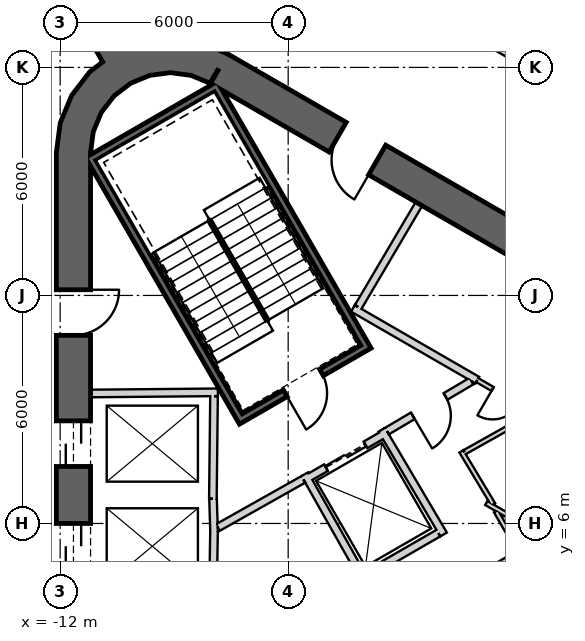
"""IFC4 building model, lengths in metres.
Left out: names, types, materials, properties, quantities, classifications, styles, units other than length and angle.
Written with IfcOpenShell. Run it as: python <this file> out.ifc"""

import sys

from ifc_helpers import new_model, si_unit, direction, frame, frame_2d, origin, place, context, subcontext, project, spatial, polyline, rectangle, outline, extrude, element, fill, save


model = new_model("IFC4")
c1 = context("Model", 3, precision=1e-05, world=origin(), true_north=direction((0.0, 1.0)))
c2 = subcontext(c1, "Body", "Model", "MODEL_VIEW")
j1 = project(units=[si_unit("LENGTHUNIT", "METRE"), si_unit("PLANEANGLEUNIT", "RADIAN")], contexts=[c1])
p1 = place(None, origin())
s1 = spatial("IfcSite", under=j1, at=p1, CompositionType="ELEMENT")
p2 = place(p1, origin())
s2 = spatial("IfcBuilding", under=s1, at=p2, CompositionType="ELEMENT")
p3 = place(p2, frame((0.0, 0.0, 241.2)))
s3 = spatial("IfcBuildingStorey", under=s2, at=p3, CompositionType="ELEMENT", Elevation=241.2)
p4 = place(p3, frame((19.475, 2.208, 0.0), z_axis=(0.0, 0.0, 1.0), x_axis=(-0.866028369851, 0.499994862586, 0.0)))
e1 = element("IfcWall", 1, at=p4, inside=s3, PredefinedType="SHEAR", context=c2, shape_type="SweptSolid", body=[
    extrude(rectangle(XDim=31.523, YDim=0.9, at=frame_2d((15.762, 0.0))), origin(), (0.0, 0.0, 1.0), 4.0),
])
p5 = place(p4, frame((7.062, 0.0, 0.0)))
e2 = element("IfcOpeningElement", 2, at=p5, cuts=e1, PredefinedType="OPENING", context=c2, shape_type="SweptSolid", body=[
    extrude(rectangle(XDim=1.2, YDim=2.4, at=frame_2d((0.6, 1.2))), frame((0.0, 0.46, 0.0), z_axis=(0.0, -1.0, 0.0), x_axis=(1.0, 0.0, 0.0)), (0.0, 0.0, 1.0), 0.92),
])
p6 = place(p4, frame((3.612, 0.0, 0.0)))
e3 = element("IfcOpeningElement", 3, at=p6, cuts=e1, PredefinedType="OPENING", context=c2, shape_type="SweptSolid", body=[
    extrude(rectangle(XDim=1.2, YDim=2.4, at=frame_2d((0.6, 1.2))), frame((0.0, 0.46, 0.0), z_axis=(0.0, -1.0, 0.0), x_axis=(1.0, 0.0, 0.0)), (0.0, 0.0, 1.0), 0.92),
])
p7 = place(p4, frame((26.712, 0.0, 0.0)))
e4 = element("IfcOpeningElement", 4, at=p7, cuts=e1, PredefinedType="OPENING", context=c2, shape_type="SweptSolid", body=[
    extrude(rectangle(XDim=1.2, YDim=2.4, at=frame_2d((0.6, 1.2))), frame((0.0, 0.46, 0.0), z_axis=(0.0, -1.0, 0.0), x_axis=(1.0, 0.0, 0.0)), (0.0, 0.0, 1.0), 0.92),
])
p8 = place(p3, frame((-11.65, 15.762, 0.0), z_axis=(0.0, 0.0, 1.0), x_axis=(0.0, -1.0, 0.0)))
e5 = element("IfcWall", 5, at=p8, inside=s3, PredefinedType="SHEAR", context=c2, shape_type="SweptSolid", body=[
    extrude(rectangle(XDim=31.523, YDim=0.9, at=frame_2d((15.762, 0.0))), origin(), (0.0, 0.0, 1.0), 4.0),
])
p9 = place(p8, frame((7.062, 0.0, 0.0)))
e6 = element("IfcOpeningElement", 6, at=p9, cuts=e5, PredefinedType="OPENING", context=c2, shape_type="SweptSolid", body=[
    extrude(rectangle(XDim=1.2, YDim=2.4, at=frame_2d((0.6, 1.2))), frame((0.0, 0.46, 0.0), z_axis=(0.0, -1.0, 0.0), x_axis=(1.0, 0.0, 0.0)), (0.0, 0.0, 1.0), 0.92),
])
p10 = place(p8, frame((9.762, 0.0, 0.0)))
e7 = element("IfcOpeningElement", 7, at=p10, cuts=e5, PredefinedType="OPENING", context=c2, shape_type="SweptSolid", body=[
    extrude(rectangle(XDim=1.2, YDim=2.4, at=frame_2d((0.6, 1.2))), frame((0.0, 0.46, 0.0), z_axis=(0.0, -1.0, 0.0), x_axis=(1.0, 0.0, 0.0)), (0.0, 0.0, 1.0), 0.92),
])
p11 = place(p8, frame((12.462, 0.0, 0.0)))
e8 = element("IfcOpeningElement", 8, at=p11, cuts=e5, PredefinedType="OPENING", context=c2, shape_type="SweptSolid", body=[
    extrude(rectangle(XDim=1.2, YDim=2.4, at=frame_2d((0.6, 1.2))), frame((0.0, 0.46, 0.0), z_axis=(0.0, -1.0, 0.0), x_axis=(1.0, 0.0, 0.0)), (0.0, 0.0, 1.0), 0.92),
])
p12 = place(p8, frame((15.162, 0.0, 0.0)))
e9 = element("IfcOpeningElement", 9, at=p12, cuts=e5, PredefinedType="OPENING", context=c2, shape_type="SweptSolid", body=[
    extrude(rectangle(XDim=1.2, YDim=2.4, at=frame_2d((0.6, 1.2))), frame((0.0, 0.46, 0.0), z_axis=(0.0, -1.0, 0.0), x_axis=(1.0, 0.0, 0.0)), (0.0, 0.0, 1.0), 0.92),
])
p13 = place(p8, frame((17.862, 0.0, 0.0)))
e10 = element("IfcOpeningElement", 10, at=p13, cuts=e5, PredefinedType="OPENING", context=c2, shape_type="SweptSolid", body=[
    extrude(rectangle(XDim=1.2, YDim=2.4, at=frame_2d((0.6, 1.2))), frame((0.0, 0.46, 0.0), z_axis=(0.0, -1.0, 0.0), x_axis=(1.0, 0.0, 0.0)), (0.0, 0.0, 1.0), 0.92),
])
p14 = place(p8, frame((20.562, 0.0, 0.0)))
e11 = element("IfcOpeningElement", 11, at=p14, cuts=e5, PredefinedType="OPENING", context=c2, shape_type="SweptSolid", body=[
    extrude(rectangle(XDim=1.2, YDim=2.4, at=frame_2d((0.6, 1.2))), frame((0.0, 0.46, 0.0), z_axis=(0.0, -1.0, 0.0), x_axis=(1.0, 0.0, 0.0)), (0.0, 0.0, 1.0), 0.92),
])
p15 = place(p8, frame((23.262, 0.0, 0.0)))
e12 = element("IfcOpeningElement", 12, at=p15, cuts=e5, PredefinedType="OPENING", context=c2, shape_type="SweptSolid", body=[
    extrude(rectangle(XDim=1.2, YDim=2.4, at=frame_2d((0.6, 1.2))), frame((0.0, 0.46, 0.0), z_axis=(0.0, -1.0, 0.0), x_axis=(1.0, 0.0, 0.0)), (0.0, 0.0, 1.0), 0.92),
])
p16 = place(p8, frame((3.612, 0.0, 0.0)))
e13 = element("IfcOpeningElement", 13, at=p16, cuts=e5, PredefinedType="OPENING", context=c2, shape_type="SweptSolid", body=[
    extrude(rectangle(XDim=1.2, YDim=2.4, at=frame_2d((0.6, 1.2))), frame((0.0, 0.46, 0.0), z_axis=(0.0, -1.0, 0.0), x_axis=(1.0, 0.0, 0.0)), (0.0, 0.0, 1.0), 0.92),
])
p17 = place(p8, frame((26.712, 0.0, 0.0)))
e14 = element("IfcOpeningElement", 14, at=p17, cuts=e5, PredefinedType="OPENING", context=c2, shape_type="SweptSolid", body=[
    extrude(rectangle(XDim=1.2, YDim=2.4, at=frame_2d((0.6, 1.2))), frame((0.0, 0.46, 0.0), z_axis=(0.0, -1.0, 0.0), x_axis=(1.0, 0.0, 0.0)), (0.0, 0.0, 1.0), 0.92),
])
p18 = place(p3, origin())
e15 = element("IfcWall", 15, at=p18, inside=s3, PredefinedType="SHEAR", context=c2, shape_type="SweptSolid", body=[
    extrude(outline(polyline([(-7.6, 18.36), (-8.323, 18.659), (-9.1, 18.762), (-9.876, 18.659), (-10.6, 18.36), (-11.221, 17.883), (-11.698, 17.262), (-11.998, 16.538), (-12.1, 15.762), (-11.2, 15.762), (-11.128, 16.305), (-10.919, 16.812), (-10.585, 17.247), (-10.15, 17.58), (-9.644, 17.79), (-9.1, 17.862), (-8.556, 17.79), (-8.05, 17.58), (-7.6, 18.36)])), origin(), (0.0, 0.0, 1.0), 4.0),
])
p19 = place(p3, frame((-10.575, 18.316, 0.0), z_axis=(0.0, 0.0, 1.0), x_axis=(-0.500002931134, 0.866023711487, 0.0)))
e16 = element("IfcWall", 16, at=p19, inside=s3, PredefinedType="SHEAR", context=c2, shape_type="SweptSolid", body=[
    extrude(rectangle(XDim=10.9, YDim=0.7, at=frame_2d((5.45, 0.0))), origin(), (0.0, 0.0, 1.0), 4.0),
])
p20 = place(p3, frame((-11.2, 9.42, 0.0), z_axis=(0.0, 0.0, 1.0), x_axis=(0.999957167047, 0.009255488683, 0.0)))
e17 = element("IfcWall", 17, at=p20, inside=s3, PredefinedType="PLUMBINGWALL", context=c2, shape_type="SweptSolid", body=[
    extrude(rectangle(XDim=3.35, YDim=0.2, at=frame_2d((1.675, 0.0))), origin(), (0.0, 0.0, 1.0), 3.7),
])
p21 = place(p3, frame((-7.951, 9.35, 0.0), z_axis=(0.0, 0.0, 1.0), x_axis=(-0.011120469654, -0.999938165666, 0.0)))
e18 = element("IfcWall", 18, at=p21, inside=s3, PredefinedType="PLUMBINGWALL", context=c2, shape_type="SweptSolid", body=[
    extrude(rectangle(XDim=2.7, YDim=0.2, at=frame_2d((1.35, 0.0))), origin(), (0.0, 0.0, 1.0), 3.7),
])
p22 = place(p3, frame((-7.977, 6.65, 0.0), z_axis=(0.0, 0.0, 1.0), x_axis=(0.030861509705, -0.999523670164, 0.0)))
e19 = element("IfcWall", 19, at=p22, inside=s3, PredefinedType="PLUMBINGWALL", context=c2, shape_type="SweptSolid", body=[
    extrude(rectangle(XDim=0.878, YDim=0.2, at=frame_2d((0.439, 0.0))), origin(), (0.0, 0.0, 1.0), 3.7),
])
p23 = place(p3, frame((-7.949, 5.894, 0.0), z_axis=(0.0, 0.0, 1.0), x_axis=(-0.016809909365, -0.999858703491, 0.0)))
e20 = element("IfcWall", 20, at=p23, inside=s3, PredefinedType="PLUMBINGWALL", context=c2, shape_type="SweptSolid", body=[
    extrude(rectangle(XDim=1.844, YDim=0.2, at=frame_2d((0.922, 0.0))), origin(), (0.0, 0.0, 1.0), 3.7),
])
p24 = place(p3, frame((-11.245, 15.678, -0.3), z_axis=(0.0, 0.0, 1.0), x_axis=(0.499977274689, -0.866038523851, 0.0)))
e21 = element("IfcWall", 21, at=p24, inside=s3, PredefinedType="SHEAR", context=c2, shape_type="SweptSolid", body=[
    extrude(rectangle(XDim=8.1, YDim=0.2, at=frame_2d((4.05, 0.0))), origin(), (0.0, 0.0, 1.0), 4.0),
])
p25 = place(p3, frame((-7.818, 17.541, -0.3), z_axis=(0.0, 0.0, 1.0), x_axis=(-0.866044365799, -0.499967155389, 0.0)))
e22 = element("IfcWall", 22, at=p25, inside=s3, PredefinedType="SHEAR", context=c2, shape_type="SweptSolid", body=[
    extrude(rectangle(XDim=3.8, YDim=0.2, at=frame_2d((1.9, 0.0))), origin(), (0.0, 0.0, 1.0), 4.0),
])
p26 = place(p3, frame((-7.854, 17.405, -0.3), z_axis=(0.0, 0.0, 1.0), x_axis=(0.499997992926, -0.866026562566, 0.0)))
e23 = element("IfcWall", 23, at=p26, inside=s3, PredefinedType="SHEAR", context=c2, shape_type="SweptSolid", body=[
    extrude(rectangle(XDim=7.9, YDim=0.2, at=frame_2d((3.95, 0.0))), origin(), (0.0, 0.0, 1.0), 4.0),
])
p27 = place(p3, frame((-7.159, 8.8, -0.3), z_axis=(0.0, 0.0, 1.0), x_axis=(0.866047807691, 0.499961193289, 0.0)))
e24 = element("IfcWall", 24, at=p27, inside=s3, PredefinedType="SHEAR", context=c2, shape_type="SweptSolid", body=[
    extrude(rectangle(XDim=3.6, YDim=0.2, at=frame_2d((1.8, 0.0))), origin(), (0.0, 0.0, 1.0), 4.0),
])
p28 = place(p27, frame((1.25, 0.0, 0.3)))
e25 = element("IfcOpeningElement", 25, at=p28, cuts=e24, PredefinedType="OPENING", context=c2, shape_type="SweptSolid", body=[
    extrude(rectangle(XDim=1.1, YDim=2.1, at=frame_2d((0.55, 1.05))), frame((0.0, 0.11, 0.0), z_axis=(0.0, -1.0, 0.0), x_axis=(1.0, 0.0, 0.0)), (0.0, 0.0, 1.0), 0.22),
])
p29 = place(p3, frame((-5.524, 7.168, 0.0), z_axis=(0.0, 0.0, 1.0), x_axis=(0.866024647952, 0.500001309137, 0.0)))
e26 = element("IfcWall", 26, at=p29, inside=s3, PredefinedType="PLUMBINGWALL", context=c2, shape_type="SweptSolid", body=[
    extrude(rectangle(XDim=2.4, YDim=0.2, at=frame_2d((1.2, 0.0))), origin(), (0.0, 0.0, 1.0), 3.7),
])
p30 = place(p29, frame((0.6, 0.0, 0.0)))
e27 = element("IfcOpeningElement", 27, at=p30, cuts=e26, PredefinedType="OPENING", context=c2, shape_type="SweptSolid", body=[
    extrude(rectangle(XDim=1.2, YDim=2.4, at=frame_2d((0.6, 1.2))), frame((0.0, 0.11, 0.0), z_axis=(0.0, -1.0, 0.0), x_axis=(1.0, 0.0, 0.0)), (0.0, 0.0, 1.0), 0.22),
])
p31 = place(p3, frame((-4.039, 4.596, 0.0), z_axis=(0.0, 0.0, 1.0), x_axis=(-0.491322718731, 0.870977603649, 0.0)))
e28 = element("IfcWall", 28, at=p31, inside=s3, PredefinedType="PLUMBINGWALL", context=c2, shape_type="SweptSolid", body=[
    extrude(rectangle(XDim=3.1, YDim=0.2, at=frame_2d((1.55, 0.0))), origin(), (0.0, 0.0, 1.0), 3.7),
])
p32 = place(p3, frame((-3.538, 8.465, 0.0), z_axis=(0.0, 0.0, 1.0), x_axis=(0.508616218331, -0.860993346345, 0.0)))
e29 = element("IfcWall", 29, at=p32, inside=s3, PredefinedType="PLUMBINGWALL", context=c2, shape_type="SweptSolid", body=[
    extrude(rectangle(XDim=3.2, YDim=0.2, at=frame_2d((1.6, 0.0))), origin(), (0.0, 0.0, 1.0), 3.7),
])
p33 = place(p3, frame((-2.047, 5.746, 0.0), z_axis=(0.0, 0.0, 1.0), x_axis=(-0.866019606374, -0.500010041276, 0.0)))
e30 = element("IfcWall", 30, at=p33, inside=s3, PredefinedType="PLUMBINGWALL", context=c2, shape_type="SweptSolid", body=[
    extrude(rectangle(XDim=2.205, YDim=0.2, at=frame_2d((1.102, 0.0))), origin(), (0.0, 0.0, 1.0), 3.7),
])
p34 = place(p3, frame((-1.024, 9.771, 0.0), z_axis=(0.0, 0.0, 1.0), x_axis=(0.866039397417, -0.499975761534, 0.0)))
e31 = element("IfcWall", 31, at=p34, inside=s3, PredefinedType="PARTITIONING", context=c2, shape_type="SweptSolid", body=[
    extrude(rectangle(XDim=1.752, YDim=0.12, at=frame_2d((0.876, 0.0))), origin(), (0.0, 0.0, 1.0), 3.7),
])
p35 = place(p34, frame((0.466, 0.0, 0.0)))
e32 = element("IfcOpeningElement", 32, at=p35, cuts=e31, PredefinedType="OPENING", context=c2, shape_type="SweptSolid", body=[
    extrude(rectangle(XDim=0.8, YDim=2.1, at=frame_2d((0.4, 1.05))), frame((0.0, 0.07, 0.0), z_axis=(0.0, -1.0, 0.0), x_axis=(1.0, 0.0, 0.0)), (0.0, 0.0, 1.0), 0.14),
])
p36 = place(p3, frame((-4.296, 11.66, 0.0), z_axis=(0.0, 0.0, 1.0), x_axis=(0.866027389382, -0.499996560828, 0.0)))
e33 = element("IfcWall", 33, at=p36, inside=s3, PredefinedType="PARTITIONING", context=c2, shape_type="SweptSolid", body=[
    extrude(rectangle(XDim=3.778, YDim=0.2, at=frame_2d((1.889, 0.0))), origin(), (0.0, 0.0, 1.0), 3.7),
])
p37 = place(p3, frame((-2.558, 14.409, 0.0), z_axis=(0.0, 0.0, 1.0), x_axis=(-0.508018930956, -0.861345903683, 0.0)))
e34 = element("IfcWall", 34, at=p37, inside=s3, PredefinedType="PARTITIONING", context=c2, shape_type="SweptSolid", body=[
    extrude(rectangle(XDim=3.15, YDim=0.2, at=frame_2d((1.575, 0.0))), origin(), (0.0, 0.0, 1.0), 3.7),
])
p38 = place(p3, frame((-5.6, 7.16, 0.0), z_axis=(0.0, 0.0, 1.0), x_axis=(-0.871340486379, -0.490678873396, 0.0)))
e35 = element("IfcWall", 35, at=p38, inside=s3, PredefinedType="PARTITIONING", context=c2, shape_type="SweptSolid", body=[
    extrude(rectangle(XDim=2.581, YDim=0.2, at=frame_2d((1.291, 0.0))), origin(), (0.0, 0.0, 1.0), 3.7),
])
p39 = place(p3, frame((-1.179, 9.745, 0.0), z_axis=(0.0, 0.0, 1.0), x_axis=(-0.860630814782, -0.509229418482, 0.0)))
e36 = element("IfcWall", 36, at=p39, inside=s3, PredefinedType="PARTITIONING", context=c2, shape_type="SweptSolid", body=[
    extrude(rectangle(XDim=2.582, YDim=0.2, at=frame_2d((1.291, 0.0))), origin(), (0.0, 0.0, 1.0), 3.7),
])
p40 = place(p39, frame((0.791, 0.0, 0.0)))
e37 = element("IfcOpeningElement", 37, at=p40, cuts=e36, PredefinedType="OPENING", context=c2, shape_type="SweptSolid", body=[
    extrude(rectangle(XDim=1.0, YDim=2.1, at=frame_2d((0.5, 1.05))), frame((0.0, 0.11, 0.0), z_axis=(0.0, -1.0, 0.0), x_axis=(1.0, 0.0, 0.0)), (0.0, 0.0, 1.0), 0.22),
])
p41 = place(p3, frame((-0.786, 6.538, 0.0), z_axis=(0.0, 0.0, 1.0), x_axis=(0.866034288228, -0.499984611377, 0.0)))
e38 = element("IfcWall", 38, at=p41, inside=s3, PredefinedType="PARTITIONING", context=c2, shape_type="SweptSolid", body=[
    extrude(rectangle(XDim=7.9, YDim=0.12, at=frame_2d((3.95, 0.0))), origin(), (0.0, 0.0, 1.0), 3.7),
])
p42 = place(p3, frame((0.709, 5.605, 0.0), z_axis=(0.0, 0.0, 1.0), x_axis=(-0.8660096254, -0.500027327967, 0.0)))
e39 = element("IfcWall", 39, at=p42, inside=s3, PredefinedType="PARTITIONING", context=c2, shape_type="SweptSolid", body=[
    extrude(rectangle(XDim=2.357, YDim=0.12, at=frame_2d((1.178, 0.0))), origin(), (0.0, 0.0, 1.0), 3.7),
])
p43 = place(p3, frame((-0.532, 6.322, 0.0), z_axis=(0.0, 0.0, 1.0), x_axis=(0.50005036918, -0.865996321171, 0.0)))
e40 = element("IfcWall", 40, at=p43, inside=s3, PredefinedType="PARTITIONING", context=c2, shape_type="SweptSolid", body=[
    extrude(rectangle(XDim=1.182, YDim=0.12, at=frame_2d((0.591, 0.0))), origin(), (0.0, 0.0, 1.0), 3.7),
])
p44 = place(p3, frame((-1.443, 7.897, 0.0), z_axis=(0.0, 0.0, 1.0), x_axis=(0.514937238613, -0.85722788119, 0.0)))
e41 = element("IfcWall", 41, at=p44, inside=s3, PredefinedType="PARTITIONING", context=c2, shape_type="SweptSolid", body=[
    extrude(rectangle(XDim=1.626, YDim=0.12, at=frame_2d((0.813, 0.0))), origin(), (0.0, 0.0, 1.0), 3.7),
])
p45 = place(p3, frame((0.414, 8.871, 0.0), z_axis=(0.0, 0.0, 1.0), x_axis=(-0.871809386997, -0.48984527429, 0.0)))
e42 = element("IfcWall", 42, at=p45, inside=s3, PredefinedType="PARTITIONING", context=c2, shape_type="SweptSolid", body=[
    extrude(rectangle(XDim=2.034, YDim=0.12, at=frame_2d((1.017, 0.0))), origin(), (0.0, 0.0, 1.0), 3.7),
])
p46 = place(p3, frame((9.675, 12.658, 0.0), z_axis=(0.0, 0.0, 1.0), x_axis=(-0.866025327327, 0.500000132428, 0.0)))
e43 = element("IfcWall", 43, at=p46, inside=s3, PredefinedType="PARTITIONING", context=c2, shape_type="SweptSolid", body=[
    extrude(rectangle(XDim=18.443, YDim=0.2, at=frame_2d((9.222, 0.0))), origin(), (0.0, 0.0, 1.0), 2.98),
])
p47 = place(p46, frame((15.138, 0.0, 0.0)))
e44 = element("IfcOpeningElement", 44, at=p47, cuts=e43, PredefinedType="OPENING", context=c2, shape_type="SweptSolid", body=[
    extrude(rectangle(XDim=1.0, YDim=2.1, at=frame_2d((0.5, 1.05))), frame((0.0, 0.11, 0.0), z_axis=(0.0, -1.0, 0.0), x_axis=(1.0, 0.0, 0.0)), (0.0, 0.0, 1.0), 0.22),
])
p48 = place(p28, origin())
e45 = element("IfcDoor", 45, at=p48, inside=s3, OperationType="SINGLE_SWING_RIGHT", PredefinedType="USERDEFINED", context=c2, shape_type="SweptSolid", body=[
    extrude(rectangle(XDim=1.1, YDim=2.1, at=frame_2d((0.55, 1.05))), frame((0.0, 0.025, 0.0), z_axis=(0.0, -1.0, 0.0), x_axis=(1.0, 0.0, 0.0)), (0.0, 0.0, 1.0), 0.05),
])
fill(e25, e45)
p49 = place(p40, origin())
e46 = element("IfcDoor", 46, at=p49, inside=s3, OperationType="SINGLE_SWING_RIGHT", PredefinedType="USERDEFINED", context=c2, shape_type="SweptSolid", body=[
    extrude(rectangle(XDim=1.0, YDim=2.1, at=frame_2d((0.5, 1.05))), frame((0.0, 0.025, 0.0), z_axis=(0.0, -1.0, 0.0), x_axis=(1.0, 0.0, 0.0)), (0.0, 0.0, 1.0), 0.05),
])
fill(e37, e46)
p50 = place(p30, origin())
e47 = element("IfcDoor", 47, at=p50, inside=s3, OperationType="SLIDING_TO_LEFT", PredefinedType="USERDEFINED", context=c2, shape_type="SweptSolid", body=[
    extrude(rectangle(XDim=1.2, YDim=2.4, at=frame_2d((0.6, 1.2))), frame((0.0, 0.025, 0.0), z_axis=(0.0, -1.0, 0.0), x_axis=(1.0, 0.0, 0.0)), (0.0, 0.0, 1.0), 0.05),
])
fill(e27, e47)
p51 = place(p35, origin())
e48 = element("IfcDoor", 48, at=p51, inside=s3, OperationType="SINGLE_SWING_RIGHT", PredefinedType="USERDEFINED", context=c2, shape_type="SweptSolid", body=[
    extrude(rectangle(XDim=0.8, YDim=2.1, at=frame_2d((0.4, 1.05))), frame((0.0, 0.025, 0.0), z_axis=(0.0, -1.0, 0.0), x_axis=(1.0, 0.0, 0.0)), (0.0, 0.0, 1.0), 0.05),
])
fill(e32, e48)
p52 = place(p9, origin())
e49 = element("IfcDoor", 49, at=p52, inside=s3, OperationType="SLIDING_TO_LEFT", PredefinedType="USERDEFINED", context=c2, shape_type="SweptSolid", body=[
    extrude(rectangle(XDim=1.2, YDim=2.4, at=frame_2d((0.6, 1.2))), frame((0.0, 0.025, 0.0), z_axis=(0.0, -1.0, 0.0), x_axis=(1.0, 0.0, 0.0)), (0.0, 0.0, 1.0), 0.05),
])
fill(e6, e49)
p53 = place(p10, origin())
e50 = element("IfcDoor", 50, at=p53, inside=s3, OperationType="SLIDING_TO_LEFT", PredefinedType="USERDEFINED", context=c2, shape_type="SweptSolid", body=[
    extrude(rectangle(XDim=1.2, YDim=2.4, at=frame_2d((0.6, 1.2))), frame((0.0, 0.025, 0.0), z_axis=(0.0, -1.0, 0.0), x_axis=(1.0, 0.0, 0.0)), (0.0, 0.0, 1.0), 0.05),
])
fill(e7, e50)
p54 = place(p7, origin())
e51 = element("IfcDoor", 51, at=p54, inside=s3, OperationType="SINGLE_SWING_LEFT", PredefinedType="USERDEFINED", context=c2, shape_type="SweptSolid", body=[
    extrude(rectangle(XDim=1.2, YDim=2.4, at=frame_2d((0.6, 1.2))), frame((0.0, 0.025, 0.0), z_axis=(0.0, -1.0, 0.0), x_axis=(1.0, 0.0, 0.0)), (0.0, 0.0, 1.0), 0.05),
])
fill(e4, e51)
p55 = place(p16, origin())
e52 = element("IfcDoor", 52, at=p55, inside=s3, OperationType="SINGLE_SWING_RIGHT", PredefinedType="USERDEFINED", context=c2, shape_type="SweptSolid", body=[
    extrude(rectangle(XDim=1.2, YDim=2.4, at=frame_2d((0.6, 1.2))), frame((0.0, 0.025, 0.0), z_axis=(0.0, -1.0, 0.0), x_axis=(1.0, 0.0, 0.0)), (0.0, 0.0, 1.0), 0.05),
])
fill(e13, e52)
save(model, sys.argv[1])
